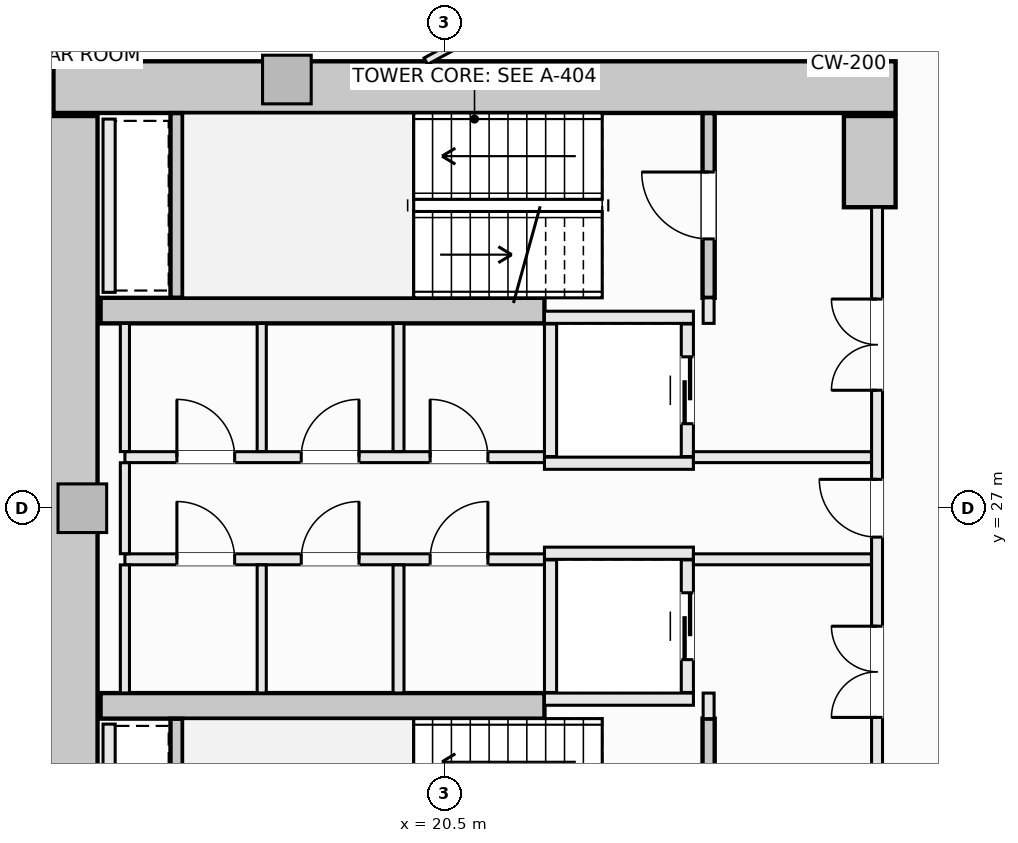
"""IFC4 building model, lengths in metres.
Left out: names, types, materials, properties, quantities, classifications, styles, units other than length and angle.
Written with IfcOpenShell. Run it as: python <this file> out.ifc"""

import sys

from ifc_helpers import new_model, si_unit, direction, frame, frame_2d, origin, origin_2d, place, context, subcontext, project, spatial, rectangle, extrude, element, fill, save


model = new_model("IFC4")
c1 = context("Model", 3, precision=1e-05, world=origin(), true_north=direction((0.0, 1.0)))
c2 = subcontext(c1, "Body", "Model", "MODEL_VIEW")
j1 = project(units=[si_unit("LENGTHUNIT", "METRE"), si_unit("PLANEANGLEUNIT", "RADIAN")], contexts=[c1])
p1 = place(None, origin())
s1 = spatial("IfcSite", under=j1, at=p1, CompositionType="ELEMENT")
p2 = place(p1, origin())
s2 = spatial("IfcBuilding", under=s1, at=p2, CompositionType="ELEMENT")
p3 = place(p2, frame((0.0, 0.0, 38.05)))
s3 = spatial("IfcBuildingStorey", under=s2, at=p3, CompositionType="ELEMENT", Elevation=38.05)
p4 = place(p3, frame((14.075, 33.925, -0.28), z_axis=(0.0, 0.0, 1.0), x_axis=(1.0, 0.0, 0.0)))
e1 = element("IfcWall", 1, at=p4, inside=s3, PredefinedType="SHEAR", context=c2, shape_type="SweptSolid", body=[
    extrude(rectangle(XDim=13.85, YDim=0.85, at=frame_2d((6.925, 0.0))), origin(), (0.0, 0.0, 1.0), 3.85),
])
p5 = place(p3, frame((14.375, 20.55, -0.28), z_axis=(0.0, 0.0, 1.0), x_axis=(0.0, 1.0, 0.0)))
e2 = element("IfcWall", 2, at=p5, inside=s3, PredefinedType="SHEAR", context=c2, shape_type="SweptSolid", body=[
    extrude(rectangle(XDim=12.9, YDim=0.85, at=frame_2d((6.45, 0.0))), origin(), (0.0, 0.0, 1.0), 3.85),
])
p6 = place(p3, frame((27.5, 31.95, -0.28), z_axis=(0.0, 0.0, 1.0), x_axis=(0.0, 1.0, 0.0)))
e3 = element("IfcWall", 3, at=p6, inside=s3, PredefinedType="SHEAR", context=c2, shape_type="SweptSolid", body=[
    extrude(rectangle(XDim=1.5, YDim=0.85, at=frame_2d((0.75, 0.0))), origin(), (0.0, 0.0, 1.0), 3.85),
])
for number, where, z_axis, x_axis in (
    (4, (14.85, 30.25, -0.28), (0.0, 0.0, 1.0), (1.0, 0.0, 0.0)),
    (5, (14.85, 23.75, -0.28), (0.0, 0.0, 1.0), (1.0, 0.0, 0.0)),
):
    element("IfcWall", number, at=place(p3, frame(where, z_axis=z_axis, x_axis=x_axis)), inside=s3, PredefinedType="SHEAR", context=c2, shape_type="SweptSolid", body=[
        extrude(rectangle(XDim=7.3, YDim=0.42, at=frame_2d((3.65, 0.0))), origin(), (0.0, 0.0, 1.0), 3.85),
    ])
for number, where, z_axis, x_axis in (
    (6, (17.914, 34.05, -0.28), (0.0, 0.0, 1.0), (1.0, 0.0, 0.0)),
    (7, (14.55, 27.0, -0.28), (0.0, 0.0, 1.0), (1.0, 0.0, 0.0)),
):
    element("IfcColumn", number, at=place(p3, frame(where, z_axis=z_axis, x_axis=x_axis)), inside=s3, PredefinedType="PILASTER", context=c2, shape_type="SweptSolid", body=[
        extrude(rectangle(XDim=0.8, YDim=0.8, at=origin_2d()), origin(), (0.0, 0.0, 1.0), 3.85),
    ])
p7 = place(p3, frame((24.85, 30.46, -0.28), z_axis=(0.0, 0.0, 1.0), x_axis=(0.0, 1.0, 0.0)))
e8 = element("IfcWall", 8, at=p7, inside=s3, PredefinedType="SHEAR", context=c2, shape_type="SweptSolid", body=[
    extrude(rectangle(XDim=3.038, YDim=0.2, at=frame_2d((1.519, 0.0))), origin(), (0.0, 0.0, 1.0), 3.85),
])
p8 = place(p7, frame((0.969, 0.0, 0.28)))
e9 = element("IfcOpeningElement", 9, at=p8, cuts=e8, PredefinedType="OPENING", context=c2, shape_type="SweptSolid", body=[
    extrude(rectangle(XDim=1.1, YDim=2.15, at=frame_2d((0.55, 1.075))), frame((0.0, 0.11, 0.0), z_axis=(0.0, -1.0, 0.0), x_axis=(1.0, 0.0, 0.0)), (0.0, 0.0, 1.0), 0.22),
])
p9 = place(p3, frame((16.1, 30.462, -0.28), z_axis=(0.0, 0.0, 1.0), x_axis=(0.0, 1.0, 0.0)))
e10 = element("IfcWall", 10, at=p9, inside=s3, PredefinedType="SHEAR", context=c2, shape_type="SweptSolid", body=[
    extrude(rectangle(XDim=3.036, YDim=0.2, at=frame_2d((1.518, 0.0))), origin(), (0.0, 0.0, 1.0), 3.85),
])
p10 = place(p3, frame((24.85, 20.502, -0.28), z_axis=(0.0, 0.0, 1.0), x_axis=(0.0, 1.0, 0.0)))
e11 = element("IfcWall", 11, at=p10, inside=s3, PredefinedType="SHEAR", context=c2, shape_type="SweptSolid", body=[
    extrude(rectangle(XDim=3.038, YDim=0.2, at=frame_2d((1.519, 0.0))), origin(), (0.0, 0.0, 1.0), 3.85),
])
p11 = place(p10, frame((0.969, 0.0, 0.28)))
e12 = element("IfcOpeningElement", 12, at=p11, cuts=e11, PredefinedType="OPENING", context=c2, shape_type="SweptSolid", body=[
    extrude(rectangle(XDim=1.1, YDim=2.15, at=frame_2d((0.55, 1.075))), frame((0.0, 0.11, 0.0), z_axis=(0.0, -1.0, 0.0), x_axis=(1.0, 0.0, 0.0)), (0.0, 0.0, 1.0), 0.22),
])
p12 = place(p3, frame((16.1, 20.502, -0.28), z_axis=(0.0, 0.0, 1.0), x_axis=(0.0, 1.0, 0.0)))
e13 = element("IfcWall", 13, at=p12, inside=s3, PredefinedType="SHEAR", context=c2, shape_type="SweptSolid", body=[
    extrude(rectangle(XDim=3.036, YDim=0.2, at=frame_2d((1.518, 0.0))), origin(), (0.0, 0.0, 1.0), 3.85),
])
for number, where, z_axis, x_axis in (
    (14, (22.15, 30.14, 0.0), (0.0, 0.0, 1.0), (1.0, 0.0, 0.0)),
    (15, (22.15, 27.74, 0.0), (0.0, 0.0, 1.0), (1.0, 0.0, 0.0)),
):
    element("IfcWall", number, at=place(p3, frame(where, z_axis=z_axis, x_axis=x_axis)), inside=s3, PredefinedType="SOLIDWALL", context=c2, shape_type="SweptSolid", body=[
        extrude(rectangle(XDim=2.45, YDim=0.2, at=frame_2d((1.225, 0.0))), origin(), (0.0, 0.0, 1.0), 3.57),
    ])
p13 = place(p3, frame((22.25, 27.85, 0.0), z_axis=(0.0, 0.0, 1.0), x_axis=(0.0, 1.0, 0.0)))
e16 = element("IfcWall", 16, at=p13, inside=s3, PredefinedType="SOLIDWALL", context=c2, shape_type="SweptSolid", body=[
    extrude(rectangle(XDim=2.18, YDim=0.2, at=frame_2d((1.09, 0.0))), origin(), (0.0, 0.0, 1.0), 3.57),
])
p14 = place(p3, frame((24.5, 27.85, 0.0), z_axis=(0.0, 0.0, 1.0), x_axis=(0.0, 1.0, 0.0)))
e17 = element("IfcWall", 17, at=p14, inside=s3, PredefinedType="SOLIDWALL", context=c2, shape_type="SweptSolid", body=[
    extrude(rectangle(XDim=2.18, YDim=0.2, at=frame_2d((1.09, 0.0))), origin(), (0.0, 0.0, 1.0), 3.57),
])
p15 = place(p14, frame((0.54, 0.0, 0.0)))
e18 = element("IfcOpeningElement", 18, at=p15, cuts=e17, PredefinedType="OPENING", context=c2, shape_type="SweptSolid", body=[
    extrude(rectangle(XDim=1.1, YDim=2.2, at=frame_2d((0.55, 1.1))), frame((0.0, 0.11, 0.0), z_axis=(0.0, -1.0, 0.0), x_axis=(1.0, 0.0, 0.0)), (0.0, 0.0, 1.0), 0.22),
])
for number, where, z_axis, x_axis in (
    (19, (22.15, 26.26, 0.0), (0.0, 0.0, 1.0), (1.0, 0.0, 0.0)),
    (20, (22.15, 23.86, 0.0), (0.0, 0.0, 1.0), (1.0, 0.0, 0.0)),
):
    element("IfcWall", number, at=place(p3, frame(where, z_axis=z_axis, x_axis=x_axis)), inside=s3, PredefinedType="SOLIDWALL", context=c2, shape_type="SweptSolid", body=[
        extrude(rectangle(XDim=2.45, YDim=0.2, at=frame_2d((1.225, 0.0))), origin(), (0.0, 0.0, 1.0), 3.57),
    ])
p16 = place(p3, frame((22.25, 23.97, 0.0), z_axis=(0.0, 0.0, 1.0), x_axis=(0.0, 1.0, 0.0)))
e21 = element("IfcWall", 21, at=p16, inside=s3, PredefinedType="SOLIDWALL", context=c2, shape_type="SweptSolid", body=[
    extrude(rectangle(XDim=2.18, YDim=0.2, at=frame_2d((1.09, 0.0))), origin(), (0.0, 0.0, 1.0), 3.57),
])
p17 = place(p3, frame((24.5, 23.97, 0.0), z_axis=(0.0, 0.0, 1.0), x_axis=(0.0, 1.0, 0.0)))
e22 = element("IfcWall", 22, at=p17, inside=s3, PredefinedType="SOLIDWALL", context=c2, shape_type="SweptSolid", body=[
    extrude(rectangle(XDim=2.18, YDim=0.2, at=frame_2d((1.09, 0.0))), origin(), (0.0, 0.0, 1.0), 3.57),
])
p18 = place(p17, frame((0.54, 0.0, 0.0)))
e23 = element("IfcOpeningElement", 23, at=p18, cuts=e22, PredefinedType="OPENING", context=c2, shape_type="SweptSolid", body=[
    extrude(rectangle(XDim=1.1, YDim=2.2, at=frame_2d((0.55, 1.1))), frame((0.0, 0.11, 0.0), z_axis=(0.0, -1.0, 0.0), x_axis=(1.0, 0.0, 0.0)), (0.0, 0.0, 1.0), 0.22),
])
for number, where, z_axis, x_axis in (
    (24, (14.99, 30.55, 0.0), (0.0, 0.0, 1.0), (0.0, 1.0, 0.0)),
    (25, (14.99, 20.6, 0.0), (0.0, 0.0, 1.0), (0.0, 1.0, 0.0)),
):
    element("IfcWall", number, at=place(p3, frame(where, z_axis=z_axis, x_axis=x_axis)), inside=s3, PredefinedType="SOLIDWALL", context=c2, shape_type="SweptSolid", body=[
        extrude(rectangle(XDim=2.85, YDim=0.2, at=frame_2d((1.425, 0.0))), origin(), (0.0, 0.0, 1.0), 3.57),
    ])
for number, where, z_axis, x_axis in (
    (26, (24.85, 23.54, 0.0), (0.0, 0.0, 1.0), (0.0, 1.0, 0.0)),
    (27, (24.85, 30.04, 0.0), (0.0, 0.0, 1.0), (0.0, 1.0, 0.0)),
):
    element("IfcWall", number, at=place(p3, frame(where, z_axis=z_axis, x_axis=x_axis)), inside=s3, PredefinedType="SOLIDWALL", context=c2, shape_type="SweptSolid", body=[
        extrude(rectangle(XDim=0.42, YDim=0.18, at=frame_2d((0.21, 0.0))), origin(), (0.0, 0.0, 1.0), 3.57),
    ])
p19 = place(p3, frame((27.62, 22.05, 0.0), z_axis=(0.0, 0.0, 1.0), x_axis=(0.0, 1.0, 0.0)))
e28 = element("IfcWall", 28, at=p19, inside=s3, PredefinedType="SOLIDWALL", context=c2, shape_type="SweptSolid", body=[
    extrude(rectangle(XDim=9.9, YDim=0.18, at=frame_2d((4.95, 0.0))), origin(), (0.0, 0.0, 1.0), 2.662),
])
p20 = place(p19, frame((4.475, 0.0, 0.0)))
e29 = element("IfcOpeningElement", 29, at=p20, cuts=e28, PredefinedType="OPENING", context=c2, shape_type="SweptSolid", body=[
    extrude(rectangle(XDim=0.95, YDim=2.1, at=frame_2d((0.475, 1.05))), frame((0.0, 0.1, 0.0), z_axis=(0.0, -1.0, 0.0), x_axis=(1.0, 0.0, 0.0)), (0.0, 0.0, 1.0), 0.2),
])
p21 = place(p19, frame((6.89, 0.0, 0.0)))
e30 = element("IfcOpeningElement", 30, at=p21, cuts=e28, PredefinedType="OPENING", context=c2, shape_type="SweptSolid", body=[
    extrude(rectangle(XDim=1.5, YDim=2.2, at=frame_2d((0.75, 1.1))), frame((0.0, 0.1, 0.0), z_axis=(0.0, -1.0, 0.0), x_axis=(1.0, 0.0, 0.0)), (0.0, 0.0, 1.0), 0.2),
])
p22 = place(p19, frame((1.51, 0.0, 0.0)))
e31 = element("IfcOpeningElement", 31, at=p22, cuts=e28, PredefinedType="OPENING", context=c2, shape_type="SweptSolid", body=[
    extrude(rectangle(XDim=1.5, YDim=2.2, at=frame_2d((0.75, 1.1))), frame((0.0, 0.1, 0.0), z_axis=(0.0, -1.0, 0.0), x_axis=(1.0, 0.0, 0.0)), (0.0, 0.0, 1.0), 0.2),
])
p23 = place(p3, frame((15.25, 27.84, 0.0), z_axis=(0.0, 0.0, 1.0), x_axis=(1.0, 0.0, 0.0)))
e32 = element("IfcWall", 32, at=p23, inside=s3, PredefinedType="SOLIDWALL", context=c2, shape_type="SweptSolid", body=[
    extrude(rectangle(XDim=6.9, YDim=0.18, at=frame_2d((3.45, 0.0))), origin(), (0.0, 0.0, 1.0), 3.57),
])
p24 = place(p23, frame((5.02, 0.0, 0.0)))
e33 = element("IfcOpeningElement", 33, at=p24, cuts=e32, PredefinedType="OPENING", context=c2, shape_type="SweptSolid", body=[
    extrude(rectangle(XDim=0.95, YDim=2.1, at=frame_2d((0.475, 1.05))), frame((0.0, 0.1, 0.0), z_axis=(0.0, -1.0, 0.0), x_axis=(1.0, 0.0, 0.0)), (0.0, 0.0, 1.0), 0.2),
])
p25 = place(p23, frame((0.855, 0.0, 0.0)))
e34 = element("IfcOpeningElement", 34, at=p25, cuts=e32, PredefinedType="OPENING", context=c2, shape_type="SweptSolid", body=[
    extrude(rectangle(XDim=0.95, YDim=2.1, at=frame_2d((0.475, 1.05))), frame((0.0, 0.1, 0.0), z_axis=(0.0, -1.0, 0.0), x_axis=(1.0, 0.0, 0.0)), (0.0, 0.0, 1.0), 0.2),
])
p26 = place(p23, frame((2.9, 0.0, 0.0)))
e35 = element("IfcOpeningElement", 35, at=p26, cuts=e32, PredefinedType="OPENING", context=c2, shape_type="SweptSolid", body=[
    extrude(rectangle(XDim=0.95, YDim=2.1, at=frame_2d((0.475, 1.05))), frame((0.0, 0.1, 0.0), z_axis=(0.0, -1.0, 0.0), x_axis=(1.0, 0.0, 0.0)), (0.0, 0.0, 1.0), 0.2),
])
p27 = place(p3, frame((24.6, 27.84, 0.0), z_axis=(0.0, 0.0, 1.0), x_axis=(1.0, 0.0, 0.0)))
e36 = element("IfcWall", 36, at=p27, inside=s3, PredefinedType="SOLIDWALL", context=c2, shape_type="SweptSolid", body=[
    extrude(rectangle(XDim=2.928, YDim=0.18, at=frame_2d((1.464, 0.0))), origin(), (0.0, 0.0, 1.0), 3.57),
])
p28 = place(p3, frame((15.25, 26.16, 0.0), z_axis=(0.0, 0.0, 1.0), x_axis=(1.0, 0.0, 0.0)))
e37 = element("IfcWall", 37, at=p28, inside=s3, PredefinedType="SOLIDWALL", context=c2, shape_type="SweptSolid", body=[
    extrude(rectangle(XDim=6.9, YDim=0.18, at=frame_2d((3.45, 0.0))), origin(), (0.0, 0.0, 1.0), 3.57),
])
p29 = place(p28, frame((5.02, 0.0, 0.0)))
e38 = element("IfcOpeningElement", 38, at=p29, cuts=e37, PredefinedType="OPENING", context=c2, shape_type="SweptSolid", body=[
    extrude(rectangle(XDim=0.95, YDim=2.1, at=frame_2d((0.475, 1.05))), frame((0.0, 0.1, 0.0), z_axis=(0.0, -1.0, 0.0), x_axis=(1.0, 0.0, 0.0)), (0.0, 0.0, 1.0), 0.2),
])
p30 = place(p28, frame((0.855, 0.0, 0.0)))
e39 = element("IfcOpeningElement", 39, at=p30, cuts=e37, PredefinedType="OPENING", context=c2, shape_type="SweptSolid", body=[
    extrude(rectangle(XDim=0.95, YDim=2.1, at=frame_2d((0.475, 1.05))), frame((0.0, 0.1, 0.0), z_axis=(0.0, -1.0, 0.0), x_axis=(1.0, 0.0, 0.0)), (0.0, 0.0, 1.0), 0.2),
])
p31 = place(p28, frame((2.9, 0.0, 0.0)))
e40 = element("IfcOpeningElement", 40, at=p31, cuts=e37, PredefinedType="OPENING", context=c2, shape_type="SweptSolid", body=[
    extrude(rectangle(XDim=0.95, YDim=2.1, at=frame_2d((0.475, 1.05))), frame((0.0, 0.1, 0.0), z_axis=(0.0, -1.0, 0.0), x_axis=(1.0, 0.0, 0.0)), (0.0, 0.0, 1.0), 0.2),
])
p32 = place(p3, frame((24.6, 26.16, 0.0), z_axis=(0.0, 0.0, 1.0), x_axis=(1.0, 0.0, 0.0)))
e41 = element("IfcWall", 41, at=p32, inside=s3, PredefinedType="SOLIDWALL", context=c2, shape_type="SweptSolid", body=[
    extrude(rectangle(XDim=2.928, YDim=0.18, at=frame_2d((1.464, 0.0))), origin(), (0.0, 0.0, 1.0), 3.57),
])
p33 = place(p3, frame((15.25, 23.962, 0.0), z_axis=(0.0, 0.0, 1.0), x_axis=(0.0, 1.0, 0.0)))
e42 = element("IfcWall", 42, at=p33, inside=s3, PredefinedType="PARTITIONING", context=c2, shape_type="SweptSolid", body=[
    extrude(rectangle(XDim=2.106, YDim=0.15, at=frame_2d((1.053, 0.0))), origin(), (0.0, 0.0, 1.0), 3.57),
])
p34 = place(p3, frame((15.25, 26.252, 0.0), z_axis=(0.0, 0.0, 1.0), x_axis=(0.0, 1.0, 0.0)))
e43 = element("IfcWall", 43, at=p34, inside=s3, PredefinedType="PARTITIONING", context=c2, shape_type="SweptSolid", body=[
    extrude(rectangle(XDim=1.496, YDim=0.15, at=frame_2d((0.748, 0.0))), origin(), (0.0, 0.0, 1.0), 3.57),
])
p35 = place(p3, frame((15.25, 27.932, 0.0), z_axis=(0.0, 0.0, 1.0), x_axis=(0.0, 1.0, 0.0)))
e44 = element("IfcWall", 44, at=p35, inside=s3, PredefinedType="PARTITIONING", context=c2, shape_type="SweptSolid", body=[
    extrude(rectangle(XDim=2.106, YDim=0.15, at=frame_2d((1.053, 0.0))), origin(), (0.0, 0.0, 1.0), 3.57),
])
for number, where, z_axis, x_axis in (
    (45, (19.75, 23.962, 0.0), (0.0, 0.0, 1.0), (0.0, 1.0, 0.0)),
    (46, (19.75, 27.932, 0.0), (0.0, 0.0, 1.0), (0.0, 1.0, 0.0)),
):
    element("IfcWall", number, at=place(p3, frame(where, z_axis=z_axis, x_axis=x_axis)), inside=s3, PredefinedType="SOLIDWALL", context=c2, shape_type="SweptSolid", body=[
        extrude(rectangle(XDim=2.106, YDim=0.18, at=frame_2d((1.053, 0.0))), origin(), (0.0, 0.0, 1.0), 3.57),
    ])
for number, where, z_axis, x_axis in (
    (47, (17.5, 23.962, 0.0), (0.0, 0.0, 1.0), (0.0, 1.0, 0.0)),
    (48, (17.5, 27.932, 0.0), (0.0, 0.0, 1.0), (0.0, 1.0, 0.0)),
):
    element("IfcWall", number, at=place(p3, frame(where, z_axis=z_axis, x_axis=x_axis)), inside=s3, PredefinedType="PARTITIONING", context=c2, shape_type="SweptSolid", body=[
        extrude(rectangle(XDim=2.106, YDim=0.15, at=frame_2d((1.053, 0.0))), origin(), (0.0, 0.0, 1.0), 3.57),
    ])
p36 = place(p3, frame((27.25, 34.352, 0.0), z_axis=(0.0, 0.0, 1.0), x_axis=(0.0, 1.0, 0.0)))
e49 = element("IfcWall", 49, at=p36, inside=s3, PredefinedType="PARTITIONING", context=c2, shape_type="SweptSolid", body=[
    extrude(rectangle(XDim=0.606, YDim=0.12, at=frame_2d((0.303, 0.0))), origin(), (0.0, 0.0, 1.0), 3.57),
])
p37 = place(p3, frame((20.199, 34.352, 0.0), z_axis=(0.0, 0.0, 1.0), x_axis=(0.880495630453, 0.474054263511, 0.0)))
e50 = element("IfcWall", 50, at=p37, inside=s3, PredefinedType="PARTITIONING", context=c2, shape_type="SweptSolid", body=[
    extrude(rectangle(XDim=1.278, YDim=0.12, at=frame_2d((0.639, 0.0))), origin(), (0.0, 0.0, 1.0), 3.57),
])
p38 = place(p8, origin())
e51 = element("IfcDoor", 51, at=p38, inside=s3, OperationType="SINGLE_SWING_RIGHT", PredefinedType="DOOR", context=c2, shape_type="SweptSolid", body=[
    extrude(rectangle(XDim=1.1, YDim=2.15, at=frame_2d((0.55, 1.075))), frame((0.0, 0.025, 0.0), z_axis=(0.0, -1.0, 0.0), x_axis=(1.0, 0.0, 0.0)), (0.0, 0.0, 1.0), 0.05),
])
fill(e9, e51)
p39 = place(p15, origin())
e52 = element("IfcDoor", 52, at=p39, inside=s3, OperationType="SLIDING_TO_LEFT", PredefinedType="DOOR", context=c2, shape_type="SweptSolid", body=[
    extrude(rectangle(XDim=1.1, YDim=2.2, at=frame_2d((0.55, 1.1))), frame((0.0, 0.025, 0.0), z_axis=(0.0, -1.0, 0.0), x_axis=(1.0, 0.0, 0.0)), (0.0, 0.0, 1.0), 0.05),
])
fill(e18, e52)
p40 = place(p18, origin())
e53 = element("IfcDoor", 53, at=p40, inside=s3, OperationType="SLIDING_TO_LEFT", PredefinedType="DOOR", context=c2, shape_type="SweptSolid", body=[
    extrude(rectangle(XDim=1.1, YDim=2.2, at=frame_2d((0.55, 1.1))), frame((0.0, 0.025, 0.0), z_axis=(0.0, -1.0, 0.0), x_axis=(1.0, 0.0, 0.0)), (0.0, 0.0, 1.0), 0.05),
])
fill(e23, e53)
p41 = place(p20, origin())
e54 = element("IfcDoor", 54, at=p41, inside=s3, OperationType="SINGLE_SWING_RIGHT", PredefinedType="DOOR", context=c2, shape_type="SweptSolid", body=[
    extrude(rectangle(XDim=0.95, YDim=2.1, at=frame_2d((0.475, 1.05))), frame((0.0, 0.025, 0.0), z_axis=(0.0, -1.0, 0.0), x_axis=(1.0, 0.0, 0.0)), (0.0, 0.0, 1.0), 0.05),
])
fill(e29, e54)
p42 = place(p21, origin())
e55 = element("IfcDoor", 55, at=p42, inside=s3, OperationType="DOUBLE_DOOR_SINGLE_SWING", PredefinedType="DOOR", context=c2, shape_type="SweptSolid", body=[
    extrude(rectangle(XDim=1.5, YDim=2.2, at=frame_2d((0.75, 1.1))), frame((0.0, 0.025, 0.0), z_axis=(0.0, -1.0, 0.0), x_axis=(1.0, 0.0, 0.0)), (0.0, 0.0, 1.0), 0.05),
])
fill(e30, e55)
p43 = place(p22, origin())
e56 = element("IfcDoor", 56, at=p43, inside=s3, OperationType="DOUBLE_DOOR_SINGLE_SWING", PredefinedType="DOOR", context=c2, shape_type="SweptSolid", body=[
    extrude(rectangle(XDim=1.5, YDim=2.2, at=frame_2d((0.75, 1.1))), frame((0.0, 0.025, 0.0), z_axis=(0.0, -1.0, 0.0), x_axis=(1.0, 0.0, 0.0)), (0.0, 0.0, 1.0), 0.05),
])
fill(e31, e56)
p44 = place(p24, origin())
e57 = element("IfcDoor", 57, at=p44, inside=s3, OperationType="SINGLE_SWING_LEFT", PredefinedType="DOOR", context=c2, shape_type="SweptSolid", body=[
    extrude(rectangle(XDim=0.95, YDim=2.1, at=frame_2d((0.475, 1.05))), frame((0.0, 0.025, 0.0), z_axis=(0.0, -1.0, 0.0), x_axis=(1.0, 0.0, 0.0)), (0.0, 0.0, 1.0), 0.05),
])
fill(e33, e57)
p45 = place(p29, origin())
e58 = element("IfcDoor", 58, at=p45, inside=s3, OperationType="SINGLE_SWING_RIGHT", PredefinedType="DOOR", context=c2, shape_type="SweptSolid", body=[
    extrude(rectangle(XDim=0.95, YDim=2.1, at=frame_2d((0.475, 1.05))), frame((0.0, 0.025, 0.0), z_axis=(0.0, -1.0, 0.0), x_axis=(1.0, 0.0, 0.0)), (0.0, 0.0, 1.0), 0.05),
])
fill(e38, e58)
p46 = place(p25, origin())
e59 = element("IfcDoor", 59, at=p46, inside=s3, OperationType="SINGLE_SWING_LEFT", PredefinedType="DOOR", context=c2, shape_type="SweptSolid", body=[
    extrude(rectangle(XDim=0.95, YDim=2.1, at=frame_2d((0.475, 1.05))), frame((0.0, 0.025, 0.0), z_axis=(0.0, -1.0, 0.0), x_axis=(1.0, 0.0, 0.0)), (0.0, 0.0, 1.0), 0.05),
])
fill(e34, e59)
p47 = place(p26, origin())
e60 = element("IfcDoor", 60, at=p47, inside=s3, OperationType="SINGLE_SWING_RIGHT", PredefinedType="DOOR", context=c2, shape_type="SweptSolid", body=[
    extrude(rectangle(XDim=0.95, YDim=2.1, at=frame_2d((0.475, 1.05))), frame((0.0, 0.025, 0.0), z_axis=(0.0, -1.0, 0.0), x_axis=(1.0, 0.0, 0.0)), (0.0, 0.0, 1.0), 0.05),
])
fill(e35, e60)
p48 = place(p30, origin())
e61 = element("IfcDoor", 61, at=p48, inside=s3, OperationType="SINGLE_SWING_LEFT", PredefinedType="DOOR", context=c2, shape_type="SweptSolid", body=[
    extrude(rectangle(XDim=0.95, YDim=2.1, at=frame_2d((0.475, 1.05))), frame((0.0, 0.025, 0.0), z_axis=(0.0, -1.0, 0.0), x_axis=(1.0, 0.0, 0.0)), (0.0, 0.0, 1.0), 0.05),
])
fill(e39, e61)
p49 = place(p31, origin())
e62 = element("IfcDoor", 62, at=p49, inside=s3, OperationType="SINGLE_SWING_RIGHT", PredefinedType="DOOR", context=c2, shape_type="SweptSolid", body=[
    extrude(rectangle(XDim=0.95, YDim=2.1, at=frame_2d((0.475, 1.05))), frame((0.0, 0.025, 0.0), z_axis=(0.0, -1.0, 0.0), x_axis=(1.0, 0.0, 0.0)), (0.0, 0.0, 1.0), 0.05),
])
fill(e40, e62)
save(model, sys.argv[1])
